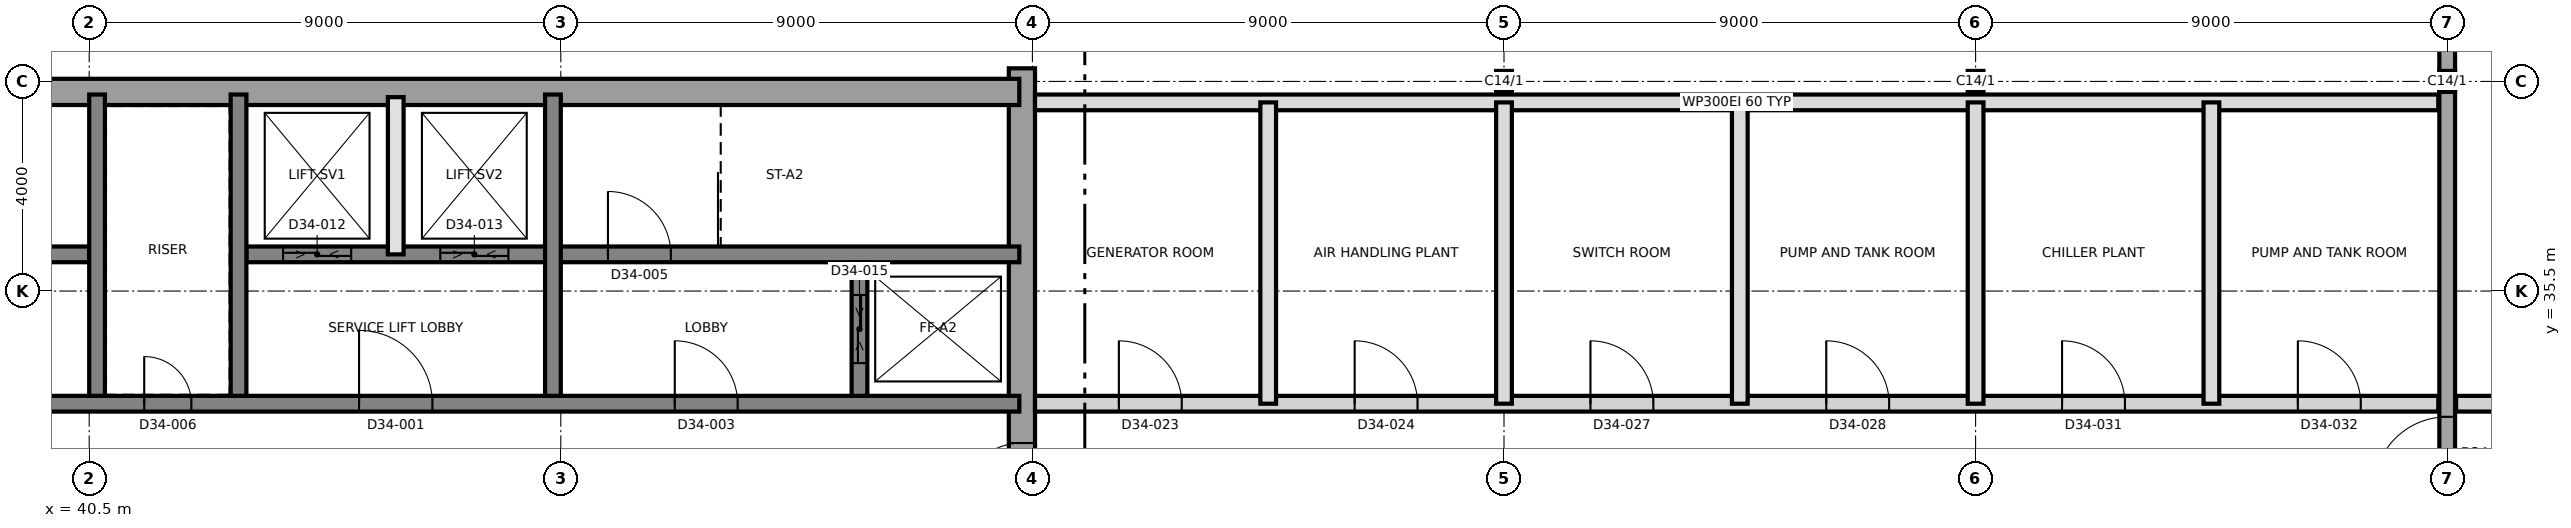
"""IFC4 building model, lengths in metres.
Left out: names, types, materials, properties, quantities, classifications, styles, units other than length and angle.
Written with IfcOpenShell. Run it as: python <this file> out.ifc"""

import sys

from ifc_helpers import new_model, si_unit, direction, frame, frame_2d, origin, origin_2d, place, context, subcontext, project, spatial, polyline, rectangle, i_section, outline, extrude, element, fill, save


model = new_model("IFC4")
c1 = context("Model", 3, precision=1e-05, world=origin(), true_north=direction((0.0, 1.0)))
c2 = subcontext(c1, "Body", "Model", "MODEL_VIEW")
j1 = project(units=[si_unit("LENGTHUNIT", "METRE"), si_unit("PLANEANGLEUNIT", "RADIAN")], contexts=[c1])
p1 = place(None, origin())
s1 = spatial("IfcSite", under=j1, at=p1, CompositionType="ELEMENT")
p2 = place(p1, origin())
s2 = spatial("IfcBuilding", under=s1, at=p2, CompositionType="ELEMENT")
p3 = place(p2, frame((0.0, 0.0, 281.3)))
s3 = spatial("IfcBuildingStorey", under=s2, at=p3, CompositionType="ELEMENT", Elevation=281.3)
p4 = place(p3, frame((58.3, 21.25, 0.0), z_axis=(0.0, 0.0, 1.0), x_axis=(0.0, 1.0, 0.0)))
e1 = element("IfcWall", 1, at=p4, inside=s3, PredefinedType="SHEAR", context=c2, shape_type="SweptSolid", body=[
    extrude(outline(polyline([(0.0, 0.0), (18.5, 0.0), (18.5, 2.12), (15.441, 4.2), (0.0, 4.2), (0.0, 0.0)])), frame((0.0, 0.25, 0.0), z_axis=(0.0, -1.0, 0.0), x_axis=(1.0, 0.0, 0.0)), (0.0, 0.0, 1.0), 0.5),
])
p5 = place(p4, frame((10.15, 0.0, 0.0)))
e2 = element("IfcOpeningElement", 2, at=p5, cuts=e1, PredefinedType="OPENING", context=c2, shape_type="SweptSolid", body=[
    extrude(rectangle(XDim=1.2, YDim=2.1, at=frame_2d((0.6, 1.05))), frame((0.0, 0.26, 0.0), z_axis=(0.0, -1.0, 0.0), x_axis=(1.0, 0.0, 0.0)), (0.0, 0.0, 1.0), 0.52),
])
p6 = place(p3, frame((31.25, 39.3, 0.0), z_axis=(0.0, 0.0, 1.0), x_axis=(1.0, 0.0, 0.0)))
e3 = element("IfcWall", 3, at=p6, inside=s3, PredefinedType="SHEAR", context=c2, shape_type="SweptSolid", body=[
    extrude(rectangle(XDim=27.0, YDim=0.5, at=frame_2d((13.5, 0.0))), origin(), (0.0, 0.0, 1.0), 2.426),
])
p7 = place(p3, frame((31.75, 33.35, 0.0), z_axis=(0.0, 0.0, 1.0), x_axis=(1.0, 0.0, 0.0)))
e4 = element("IfcWall", 4, at=p7, inside=s3, PredefinedType="SHEAR", context=c2, shape_type="SweptSolid", body=[
    extrude(rectangle(XDim=26.5, YDim=0.3, at=frame_2d((13.25, 0.0))), origin(), (0.0, 0.0, 1.0), 4.2),
])
p8 = place(p7, frame((13.9, 0.0, 0.0)))
e5 = element("IfcOpeningElement", 5, at=p8, cuts=e4, PredefinedType="OPENING", context=c2, shape_type="SweptSolid", body=[
    extrude(rectangle(XDim=1.4, YDim=2.1, at=frame_2d((0.7, 1.05))), frame((0.0, 0.16, 0.0), z_axis=(0.0, -1.0, 0.0), x_axis=(1.0, 0.0, 0.0)), (0.0, 0.0, 1.0), 0.32),
])
p9 = place(p7, frame((5.375, 0.0, 0.0)))
e6 = element("IfcOpeningElement", 6, at=p9, cuts=e4, PredefinedType="OPENING", context=c2, shape_type="SweptSolid", body=[
    extrude(rectangle(XDim=1.2, YDim=2.1, at=frame_2d((0.6, 1.05))), frame((0.0, 0.16, 0.0), z_axis=(0.0, -1.0, 0.0), x_axis=(1.0, 0.0, 0.0)), (0.0, 0.0, 1.0), 0.32),
])
p10 = place(p7, frame((19.925, 0.0, 0.0)))
e7 = element("IfcOpeningElement", 7, at=p10, cuts=e4, PredefinedType="OPENING", context=c2, shape_type="SweptSolid", body=[
    extrude(rectangle(XDim=1.2, YDim=2.1, at=frame_2d((0.6, 1.05))), frame((0.0, 0.16, 0.0), z_axis=(0.0, -1.0, 0.0), x_axis=(1.0, 0.0, 0.0)), (0.0, 0.0, 1.0), 0.32),
])
p11 = place(p7, frame((9.8, 0.0, 0.0)))
e8 = element("IfcOpeningElement", 8, at=p11, cuts=e4, PredefinedType="OPENING", context=c2, shape_type="SweptSolid", body=[
    extrude(rectangle(XDim=0.9, YDim=2.1, at=frame_2d((0.45, 1.05))), frame((0.0, 0.16, 0.0), z_axis=(0.0, -1.0, 0.0), x_axis=(1.0, 0.0, 0.0)), (0.0, 0.0, 1.0), 0.32),
])
p12 = place(p3, frame((31.75, 36.2, 0.0), z_axis=(0.0, 0.0, 1.0), x_axis=(1.0, 0.0, 0.0)))
e9 = element("IfcWall", 9, at=p12, inside=s3, PredefinedType="SHEAR", context=c2, shape_type="SweptSolid", body=[
    extrude(rectangle(XDim=8.75, YDim=0.3, at=frame_2d((4.375, 0.0))), origin(), (0.0, 0.0, 1.0), 4.2),
])
p13 = place(p12, frame((6.65, 0.0, 0.0)))
e10 = element("IfcOpeningElement", 10, at=p13, cuts=e9, PredefinedType="OPENING", context=c2, shape_type="SweptSolid", body=[
    extrude(rectangle(XDim=1.2, YDim=2.1, at=frame_2d((0.6, 1.05))), frame((0.0, 0.16, 0.0), z_axis=(0.0, -1.0, 0.0), x_axis=(1.0, 0.0, 0.0)), (0.0, 0.0, 1.0), 0.32),
])
p14 = place(p3, frame((43.5, 36.2, 0.0), z_axis=(0.0, 0.0, 1.0), x_axis=(1.0, 0.0, 0.0)))
e11 = element("IfcWall", 11, at=p14, inside=s3, PredefinedType="SHEAR", context=c2, shape_type="SweptSolid", body=[
    extrude(rectangle(XDim=14.75, YDim=0.3, at=frame_2d((7.375, 0.0))), origin(), (0.0, 0.0, 1.0), 4.2),
])
p15 = place(p14, frame((6.9, 0.0, 0.0)))
e12 = element("IfcOpeningElement", 12, at=p15, cuts=e11, PredefinedType="OPENING", context=c2, shape_type="SweptSolid", body=[
    extrude(rectangle(XDim=1.2, YDim=2.1, at=frame_2d((0.6, 1.05))), frame((0.0, 0.16, 0.0), z_axis=(0.0, -1.0, 0.0), x_axis=(1.0, 0.0, 0.0)), (0.0, 0.0, 1.0), 0.32),
])
p16 = place(p14, frame((0.7, 0.0, 0.0)))
e13 = element("IfcOpeningElement", 13, at=p16, cuts=e11, PredefinedType="OPENING", context=c2, shape_type="SweptSolid", body=[
    extrude(rectangle(XDim=1.3, YDim=2.4, at=frame_2d((0.65, 1.2))), frame((0.0, 0.16, 0.0), z_axis=(0.0, -1.0, 0.0), x_axis=(1.0, 0.0, 0.0)), (0.0, 0.0, 1.0), 0.32),
])
p17 = place(p14, frame((3.7, 0.0, 0.0)))
e14 = element("IfcOpeningElement", 14, at=p17, cuts=e11, PredefinedType="OPENING", context=c2, shape_type="SweptSolid", body=[
    extrude(rectangle(XDim=1.3, YDim=2.4, at=frame_2d((0.65, 1.2))), frame((0.0, 0.16, 0.0), z_axis=(0.0, -1.0, 0.0), x_axis=(1.0, 0.0, 0.0)), (0.0, 0.0, 1.0), 0.32),
])
for number, where, z_axis, x_axis in (
    (15, (40.65, 33.5, 0.0), (0.0, 0.0, 1.0), (0.0, 1.0, 0.0)),
    (16, (43.35, 33.5, 0.0), (0.0, 0.0, 1.0), (0.0, 1.0, 0.0)),
    (17, (49.35, 33.5, 0.0), (0.0, 0.0, 1.0), (0.0, 1.0, 0.0)),
):
    element("IfcWall", number, at=place(p3, frame(where, z_axis=z_axis, x_axis=x_axis)), inside=s3, PredefinedType="SHEAR", context=c2, shape_type="SweptSolid", body=[
        extrude(outline(polyline([(0.0, 0.0), (5.75, 0.0), (5.75, 2.46), (3.191, 4.2), (0.0, 4.2), (0.0, 0.0)])), frame((0.0, 0.15, 0.0), z_axis=(0.0, -1.0, 0.0), x_axis=(1.0, 0.0, 0.0)), (0.0, 0.0, 1.0), 0.3),
    ])
p18 = place(p3, frame((55.2, 33.5, 0.0), z_axis=(0.0, 0.0, 1.0), x_axis=(0.0, 1.0, 0.0)))
e18 = element("IfcWall", 18, at=p18, inside=s3, PredefinedType="SHEAR", context=c2, shape_type="SweptSolid", body=[
    extrude(rectangle(XDim=2.55, YDim=0.3, at=frame_2d((1.275, 0.0))), origin(), (0.0, 0.0, 1.0), 4.2),
])
p19 = place(p18, frame((0.625, 0.0, 0.0)))
e19 = element("IfcOpeningElement", 19, at=p19, cuts=e18, PredefinedType="OPENING", context=c2, shape_type="SweptSolid", body=[
    extrude(rectangle(XDim=1.3, YDim=2.4, at=frame_2d((0.65, 1.2))), frame((0.0, 0.16, 0.0), z_axis=(0.0, -1.0, 0.0), x_axis=(1.0, 0.0, 0.0)), (0.0, 0.0, 1.0), 0.32),
])
p20 = place(p3, frame((85.5, 20.35, 0.0), z_axis=(0.0, 0.0, 1.0), x_axis=(0.0, 1.0, 0.0)))
e20 = element("IfcWall", 20, at=p20, inside=s3, PredefinedType="SHEAR", context=c2, shape_type="SweptSolid", body=[
    extrude(outline(polyline([(0.0, 0.0), (20.3, 0.0), (20.3, 1.508), (16.341, 4.2), (0.0, 4.2), (0.0, 0.0)])), frame((0.0, 0.15, 0.0), z_axis=(0.0, -1.0, 0.0), x_axis=(1.0, 0.0, 0.0)), (0.0, 0.0, 1.0), 0.3),
])
p21 = place(p20, frame((11.35, 0.0, 0.0)))
e21 = element("IfcOpeningElement", 21, at=p21, cuts=e20, PredefinedType="OPENING", context=c2, shape_type="SweptSolid", body=[
    extrude(rectangle(XDim=1.4, YDim=2.1, at=frame_2d((0.7, 1.05))), frame((0.0, 0.16, 0.0), z_axis=(0.0, -1.0, 0.0), x_axis=(1.0, 0.0, 0.0)), (0.0, 0.0, 1.0), 0.32),
])
for number, where, z_axis, x_axis in (
    (22, (67.5, 39.5, 0.0), (0.0, 0.0, 1.0), (1.0, 0.0, 0.0)),
    (23, (76.5, 39.5, 0.0), (0.0, 0.0, 1.0), (1.0, 0.0, 0.0)),
    (24, (85.5, 39.5, 0.0), (0.0, 0.0, 1.0), (1.0, 0.0, 0.0)),
):
    element("IfcColumn", number, at=place(p3, frame(where, z_axis=z_axis, x_axis=x_axis)), inside=s3, PredefinedType="COLUMN", context=c2, shape_type="SweptSolid", body=[
        extrude(i_section(OverallWidth=0.3, OverallDepth=0.4, WebThickness=0.013, FlangeThickness=0.024, FilletRadius=0.027, at=origin_2d()), origin(), (0.0, 0.0, 1.0), 2.29),
    ])
p22 = place(p3, frame((46.35, 36.2, 0.0), z_axis=(0.0, 0.0, 1.0), x_axis=(0.0, 1.0, 0.0)))
e25 = element("IfcWall", 25, at=p22, inside=s3, PredefinedType="SOLIDWALL", context=c2, shape_type="SweptSolid", body=[
    extrude(rectangle(XDim=3.0, YDim=0.3, at=frame_2d((1.5, 0.0))), origin(), (0.0, 0.0, 1.0), 3.9),
])
p23 = place(p3, frame((58.55, 33.35, 0.0), z_axis=(0.0, 0.0, 1.0), x_axis=(1.0, 0.0, 0.0)))
e26 = element("IfcWall", 26, at=p23, inside=s3, PredefinedType="PARTITIONING", context=c2, shape_type="SweptSolid", body=[
    extrude(rectangle(XDim=26.78, YDim=0.3, at=frame_2d((13.39, 0.0))), origin(), (0.0, 0.0, 1.0), 3.9),
])
p24 = place(p23, frame((1.6, 0.0, 0.0)))
e27 = element("IfcOpeningElement", 27, at=p24, cuts=e26, PredefinedType="OPENING", context=c2, shape_type="SweptSolid", body=[
    extrude(rectangle(XDim=1.2, YDim=2.1, at=frame_2d((0.6, 1.05))), frame((0.0, 0.16, 0.0), z_axis=(0.0, -1.0, 0.0), x_axis=(1.0, 0.0, 0.0)), (0.0, 0.0, 1.0), 0.32),
])
p25 = place(p23, frame((6.1, 0.0, 0.0)))
e28 = element("IfcOpeningElement", 28, at=p25, cuts=e26, PredefinedType="OPENING", context=c2, shape_type="SweptSolid", body=[
    extrude(rectangle(XDim=1.2, YDim=2.1, at=frame_2d((0.6, 1.05))), frame((0.0, 0.16, 0.0), z_axis=(0.0, -1.0, 0.0), x_axis=(1.0, 0.0, 0.0)), (0.0, 0.0, 1.0), 0.32),
])
p26 = place(p23, frame((10.6, 0.0, 0.0)))
e29 = element("IfcOpeningElement", 29, at=p26, cuts=e26, PredefinedType="OPENING", context=c2, shape_type="SweptSolid", body=[
    extrude(rectangle(XDim=1.2, YDim=2.1, at=frame_2d((0.6, 1.05))), frame((0.0, 0.16, 0.0), z_axis=(0.0, -1.0, 0.0), x_axis=(1.0, 0.0, 0.0)), (0.0, 0.0, 1.0), 0.32),
])
p27 = place(p23, frame((15.1, 0.0, 0.0)))
e30 = element("IfcOpeningElement", 30, at=p27, cuts=e26, PredefinedType="OPENING", context=c2, shape_type="SweptSolid", body=[
    extrude(rectangle(XDim=1.2, YDim=2.1, at=frame_2d((0.6, 1.05))), frame((0.0, 0.16, 0.0), z_axis=(0.0, -1.0, 0.0), x_axis=(1.0, 0.0, 0.0)), (0.0, 0.0, 1.0), 0.32),
])
p28 = place(p23, frame((19.6, 0.0, 0.0)))
e31 = element("IfcOpeningElement", 31, at=p28, cuts=e26, PredefinedType="OPENING", context=c2, shape_type="SweptSolid", body=[
    extrude(rectangle(XDim=1.2, YDim=2.1, at=frame_2d((0.6, 1.05))), frame((0.0, 0.16, 0.0), z_axis=(0.0, -1.0, 0.0), x_axis=(1.0, 0.0, 0.0)), (0.0, 0.0, 1.0), 0.32),
])
p29 = place(p23, frame((24.1, 0.0, 0.0)))
e32 = element("IfcOpeningElement", 32, at=p29, cuts=e26, PredefinedType="OPENING", context=c2, shape_type="SweptSolid", body=[
    extrude(rectangle(XDim=1.2, YDim=2.1, at=frame_2d((0.6, 1.05))), frame((0.0, 0.16, 0.0), z_axis=(0.0, -1.0, 0.0), x_axis=(1.0, 0.0, 0.0)), (0.0, 0.0, 1.0), 0.32),
])
p30 = place(p3, frame((85.67, 33.35, 0.0), z_axis=(0.0, 0.0, 1.0), x_axis=(1.0, 0.0, 0.0)))
e33 = element("IfcWall", 33, at=p30, inside=s3, PredefinedType="PARTITIONING", context=c2, shape_type="SweptSolid", body=[
    extrude(rectangle(XDim=9.705, YDim=0.3, at=frame_2d((4.853, 0.0))), origin(), (0.0, 0.0, 1.0), 3.9),
])
p31 = place(p30, frame((1.83, 0.0, 0.0)))
e34 = element("IfcOpeningElement", 34, at=p31, cuts=e33, PredefinedType="OPENING", context=c2, shape_type="SweptSolid", body=[
    extrude(rectangle(XDim=1.0, YDim=2.1, at=frame_2d((0.5, 1.05))), frame((0.0, 0.16, 0.0), z_axis=(0.0, -1.0, 0.0), x_axis=(1.0, 0.0, 0.0)), (0.0, 0.0, 1.0), 0.32),
])
p32 = place(p30, frame((5.63, 0.0, 0.0)))
e35 = element("IfcOpeningElement", 35, at=p32, cuts=e33, PredefinedType="OPENING", context=c2, shape_type="SweptSolid", body=[
    extrude(rectangle(XDim=1.0, YDim=2.1, at=frame_2d((0.5, 1.05))), frame((0.0, 0.16, 0.0), z_axis=(0.0, -1.0, 0.0), x_axis=(1.0, 0.0, 0.0)), (0.0, 0.0, 1.0), 0.32),
])
p33 = place(p3, frame((58.55, 39.1, 0.0), z_axis=(0.0, 0.0, 1.0), x_axis=(1.0, 0.0, 0.0)))
e36 = element("IfcWall", 36, at=p33, inside=s3, PredefinedType="PARTITIONING", context=c2, shape_type="SweptSolid", body=[
    extrude(rectangle(XDim=26.78, YDim=0.3, at=frame_2d((13.39, 0.0))), origin(), (0.0, 0.0, 1.0), 3.85),
])
for number, where, z_axis, x_axis in (
    (37, (63.0, 33.35, 0.0), (0.0, 0.0, 1.0), (0.0, 1.0, 0.0)),
    (38, (67.5, 33.35, 0.0), (0.0, 0.0, 1.0), (0.0, 1.0, 0.0)),
    (39, (72.0, 33.35, 0.0), (0.0, 0.0, 1.0), (0.0, 1.0, 0.0)),
    (40, (76.5, 33.35, 0.0), (0.0, 0.0, 1.0), (0.0, 1.0, 0.0)),
    (41, (81.0, 33.35, 0.0), (0.0, 0.0, 1.0), (0.0, 1.0, 0.0)),
):
    element("IfcWall", number, at=place(p3, frame(where, z_axis=z_axis, x_axis=x_axis)), inside=s3, PredefinedType="PARTITIONING", context=c2, shape_type="SweptSolid", body=[
        extrude(rectangle(XDim=5.75, YDim=0.3, at=frame_2d((2.875, 0.0))), origin(), (0.0, 0.0, 1.0), 3.85),
    ])
p34 = place(p8, origin())
e42 = element("IfcDoor", 42, at=p34, inside=s3, OperationType="SINGLE_SWING_RIGHT", PredefinedType="DOOR", context=c2, shape_type="SweptSolid", body=[
    extrude(rectangle(XDim=1.4, YDim=2.1, at=frame_2d((0.7, 1.05))), frame((0.0, 0.025, 0.0), z_axis=(0.0, -1.0, 0.0), x_axis=(1.0, 0.0, 0.0)), (0.0, 0.0, 1.0), 0.05),
])
fill(e5, e42)
p35 = place(p10, origin())
e43 = element("IfcDoor", 43, at=p35, inside=s3, OperationType="SINGLE_SWING_RIGHT", PredefinedType="DOOR", context=c2, shape_type="SweptSolid", body=[
    extrude(rectangle(XDim=1.2, YDim=2.1, at=frame_2d((0.6, 1.05))), frame((0.0, 0.025, 0.0), z_axis=(0.0, -1.0, 0.0), x_axis=(1.0, 0.0, 0.0)), (0.0, 0.0, 1.0), 0.05),
])
fill(e7, e43)
p36 = place(p15, origin())
e44 = element("IfcDoor", 44, at=p36, inside=s3, OperationType="SINGLE_SWING_LEFT", PredefinedType="DOOR", context=c2, shape_type="SweptSolid", body=[
    extrude(rectangle(XDim=1.2, YDim=2.1, at=frame_2d((0.6, 1.05))), frame((0.0, 0.025, 0.0), z_axis=(0.0, -1.0, 0.0), x_axis=(1.0, 0.0, 0.0)), (0.0, 0.0, 1.0), 0.05),
])
fill(e12, e44)
p37 = place(p11, origin())
e45 = element("IfcDoor", 45, at=p37, inside=s3, OperationType="SINGLE_SWING_LEFT", PredefinedType="DOOR", context=c2, shape_type="SweptSolid", body=[
    extrude(rectangle(XDim=0.9, YDim=2.1, at=frame_2d((0.45, 1.05))), frame((0.0, 0.025, 0.0), z_axis=(0.0, -1.0, 0.0), x_axis=(1.0, 0.0, 0.0)), (0.0, 0.0, 1.0), 0.05),
])
fill(e8, e45)
p38 = place(p5, origin())
e46 = element("IfcDoor", 46, at=p38, inside=s3, OperationType="SINGLE_SWING_LEFT", PredefinedType="DOOR", context=c2, shape_type="SweptSolid", body=[
    extrude(rectangle(XDim=1.2, YDim=2.1, at=frame_2d((0.6, 1.05))), frame((0.0, 0.025, 0.0), z_axis=(0.0, -1.0, 0.0), x_axis=(1.0, 0.0, 0.0)), (0.0, 0.0, 1.0), 0.05),
])
fill(e2, e46)
p39 = place(p16, origin())
e47 = element("IfcDoor", 47, at=p39, inside=s3, OperationType="SLIDING_TO_LEFT", PredefinedType="DOOR", context=c2, shape_type="SweptSolid", body=[
    extrude(rectangle(XDim=1.3, YDim=2.4, at=frame_2d((0.65, 1.2))), frame((0.0, 0.025, 0.0), z_axis=(0.0, -1.0, 0.0), x_axis=(1.0, 0.0, 0.0)), (0.0, 0.0, 1.0), 0.05),
])
fill(e13, e47)
p40 = place(p17, origin())
e48 = element("IfcDoor", 48, at=p40, inside=s3, OperationType="SLIDING_TO_LEFT", PredefinedType="DOOR", context=c2, shape_type="SweptSolid", body=[
    extrude(rectangle(XDim=1.3, YDim=2.4, at=frame_2d((0.65, 1.2))), frame((0.0, 0.025, 0.0), z_axis=(0.0, -1.0, 0.0), x_axis=(1.0, 0.0, 0.0)), (0.0, 0.0, 1.0), 0.05),
])
fill(e14, e48)
p41 = place(p19, origin())
e49 = element("IfcDoor", 49, at=p41, inside=s3, OperationType="SLIDING_TO_LEFT", PredefinedType="DOOR", context=c2, shape_type="SweptSolid", body=[
    extrude(rectangle(XDim=1.3, YDim=2.4, at=frame_2d((0.65, 1.2))), frame((0.0, 0.025, 0.0), z_axis=(0.0, -1.0, 0.0), x_axis=(1.0, 0.0, 0.0)), (0.0, 0.0, 1.0), 0.05),
])
fill(e19, e49)
p42 = place(p24, origin())
e50 = element("IfcDoor", 50, at=p42, inside=s3, OperationType="SINGLE_SWING_LEFT", PredefinedType="DOOR", context=c2, shape_type="SweptSolid", body=[
    extrude(rectangle(XDim=1.2, YDim=2.1, at=frame_2d((0.6, 1.05))), frame((0.0, 0.025, 0.0), z_axis=(0.0, -1.0, 0.0), x_axis=(1.0, 0.0, 0.0)), (0.0, 0.0, 1.0), 0.05),
])
fill(e27, e50)
p43 = place(p25, origin())
e51 = element("IfcDoor", 51, at=p43, inside=s3, OperationType="SINGLE_SWING_LEFT", PredefinedType="DOOR", context=c2, shape_type="SweptSolid", body=[
    extrude(rectangle(XDim=1.2, YDim=2.1, at=frame_2d((0.6, 1.05))), frame((0.0, 0.025, 0.0), z_axis=(0.0, -1.0, 0.0), x_axis=(1.0, 0.0, 0.0)), (0.0, 0.0, 1.0), 0.05),
])
fill(e28, e51)
p44 = place(p26, origin())
e52 = element("IfcDoor", 52, at=p44, inside=s3, OperationType="SINGLE_SWING_LEFT", PredefinedType="DOOR", context=c2, shape_type="SweptSolid", body=[
    extrude(rectangle(XDim=1.2, YDim=2.1, at=frame_2d((0.6, 1.05))), frame((0.0, 0.025, 0.0), z_axis=(0.0, -1.0, 0.0), x_axis=(1.0, 0.0, 0.0)), (0.0, 0.0, 1.0), 0.05),
])
fill(e29, e52)
p45 = place(p27, origin())
e53 = element("IfcDoor", 53, at=p45, inside=s3, OperationType="SINGLE_SWING_RIGHT", PredefinedType="DOOR", context=c2, shape_type="SweptSolid", body=[
    extrude(rectangle(XDim=1.2, YDim=2.1, at=frame_2d((0.6, 1.05))), frame((0.0, 0.025, 0.0), z_axis=(0.0, -1.0, 0.0), x_axis=(1.0, 0.0, 0.0)), (0.0, 0.0, 1.0), 0.05),
])
fill(e30, e53)
p46 = place(p28, origin())
e54 = element("IfcDoor", 54, at=p46, inside=s3, OperationType="SINGLE_SWING_RIGHT", PredefinedType="DOOR", context=c2, shape_type="SweptSolid", body=[
    extrude(rectangle(XDim=1.2, YDim=2.1, at=frame_2d((0.6, 1.05))), frame((0.0, 0.025, 0.0), z_axis=(0.0, -1.0, 0.0), x_axis=(1.0, 0.0, 0.0)), (0.0, 0.0, 1.0), 0.05),
])
fill(e31, e54)
p47 = place(p29, origin())
e55 = element("IfcDoor", 55, at=p47, inside=s3, OperationType="SINGLE_SWING_LEFT", PredefinedType="DOOR", context=c2, shape_type="SweptSolid", body=[
    extrude(rectangle(XDim=1.2, YDim=2.1, at=frame_2d((0.6, 1.05))), frame((0.0, 0.025, 0.0), z_axis=(0.0, -1.0, 0.0), x_axis=(1.0, 0.0, 0.0)), (0.0, 0.0, 1.0), 0.05),
])
fill(e32, e55)
p48 = place(p21, origin())
e56 = element("IfcDoor", 56, at=p48, inside=s3, OperationType="SINGLE_SWING_RIGHT", PredefinedType="DOOR", context=c2, shape_type="SweptSolid", body=[
    extrude(rectangle(XDim=1.4, YDim=2.1, at=frame_2d((0.7, 1.05))), frame((0.0, 0.025, 0.0), z_axis=(0.0, -1.0, 0.0), x_axis=(1.0, 0.0, 0.0)), (0.0, 0.0, 1.0), 0.05),
])
fill(e21, e56)
save(model, sys.argv[1])
